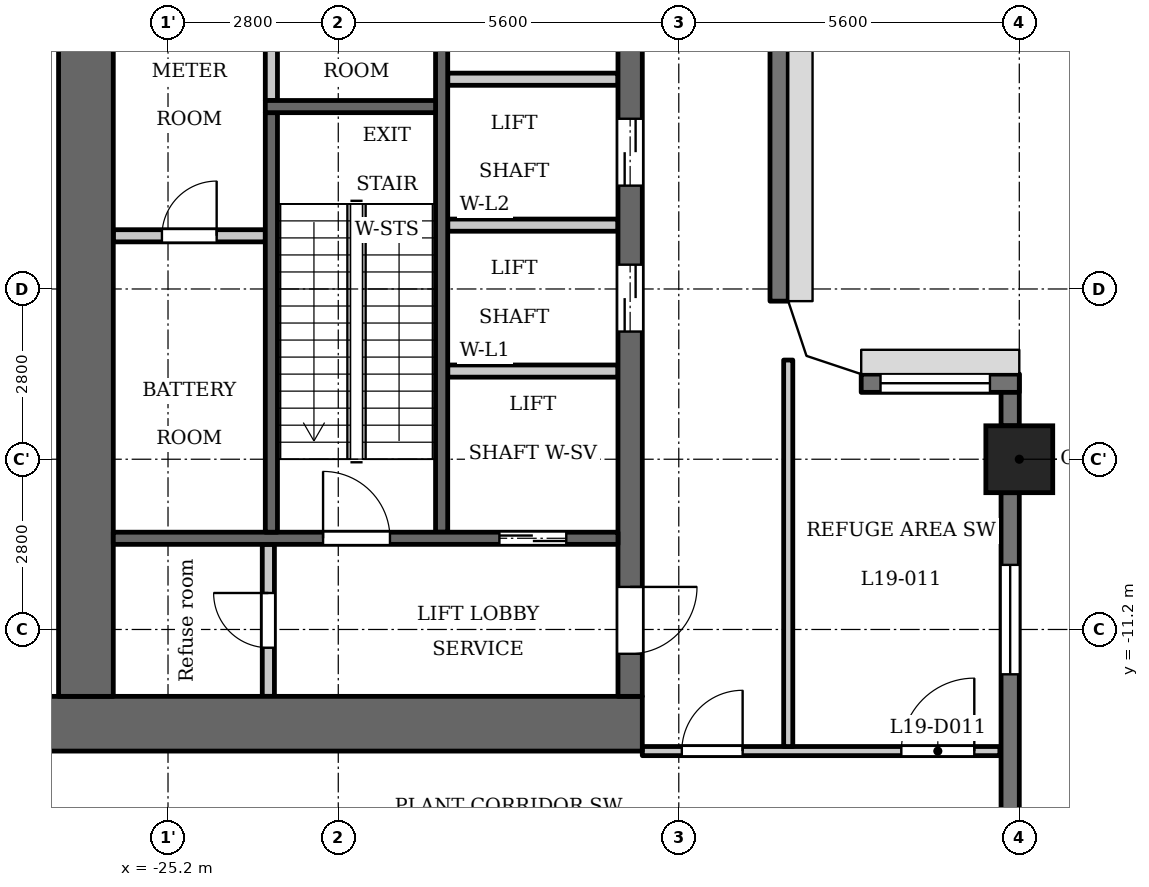
"""IFC4 building model, lengths in metres.
Left out: names, types, materials, properties, quantities, classifications, styles, units other than length and angle.
Written with IfcOpenShell. Run it as: python <this file> out.ifc"""

import sys

from ifc_helpers import new_model, si_unit, direction, frame, frame_2d, origin, origin_2d, place, context, subcontext, project, spatial, polyline, rectangle, outline, extrude, element, fill, save


model = new_model("IFC4")
c1 = context("Model", 3, precision=1e-05, world=origin(), true_north=direction((0.0, 1.0)))
c2 = subcontext(c1, "Body", "Model", "MODEL_VIEW")
j1 = project(units=[si_unit("LENGTHUNIT", "METRE"), si_unit("PLANEANGLEUNIT", "RADIAN")], contexts=[c1])
p1 = place(None, origin())
s1 = spatial("IfcSite", under=j1, at=p1, CompositionType="ELEMENT")
p2 = place(p1, origin())
s2 = spatial("IfcBuilding", under=s1, at=p2, CompositionType="ELEMENT")
p3 = place(p2, frame((0.0, 0.0, 77.9)))
s3 = spatial("IfcBuildingStorey", under=s2, at=p3, CompositionType="ELEMENT", Elevation=77.9)
p4 = place(p3, frame((-11.2, -8.4, 0.0), z_axis=(0.0, 0.0, 1.0), x_axis=(1.0, 0.0, 0.0)))
e1 = element("IfcColumn", 1, at=p4, inside=s3, PredefinedType="COLUMN", context=c2, shape_type="SweptSolid", body=[
    extrude(rectangle(XDim=1.1, YDim=1.1, at=origin_2d()), origin(), (0.0, 0.0, 1.0), 5.4),
])
p5 = place(p3, frame((-11.35, -14.925, 0.0), z_axis=(0.0, 0.0, 1.0), x_axis=(0.0, 1.0, 0.0)))
e2 = element("IfcWall", 2, at=p5, inside=s3, PredefinedType="SOLIDWALL", context=c2, shape_type="SweptSolid", body=[
    extrude(rectangle(XDim=5.975, YDim=0.3, at=frame_2d((2.988, 0.0))), origin(), (0.0, 0.0, 1.0), 5.1),
])
p6 = place(p5, frame((2.988, 0.0, 0.9)))
e3 = element("IfcOpeningElement", 3, at=p6, cuts=e2, PredefinedType="OPENING", context=c2, shape_type="SweptSolid", body=[
    extrude(rectangle(XDim=1.8, YDim=1.5, at=frame_2d((0.9, 0.75))), frame((0.0, 0.16, 0.0), z_axis=(0.0, -1.0, 0.0), x_axis=(1.0, 0.0, 0.0)), (0.0, 0.0, 1.0), 0.32),
])
p7 = place(p3, frame((-11.35, -7.85, 0.0), z_axis=(0.0, 0.0, 1.0), x_axis=(0.0, 1.0, 0.0)))
e4 = element("IfcWall", 4, at=p7, inside=s3, PredefinedType="SOLIDWALL", context=c2, shape_type="SweptSolid", body=[
    extrude(rectangle(XDim=0.85, YDim=0.3, at=frame_2d((0.425, 0.0))), origin(), (0.0, 0.0, 1.0), 5.1),
])
p8 = place(p3, frame((-11.2, -7.15, 0.0), z_axis=(0.0, 0.0, 1.0), x_axis=(-1.0, 0.0, 0.0)))
e5 = element("IfcWall", 5, at=p8, inside=s3, PredefinedType="SOLIDWALL", context=c2, shape_type="SweptSolid", body=[
    extrude(rectangle(XDim=2.6, YDim=0.3, at=frame_2d((1.3, 0.0))), origin(), (0.0, 0.0, 1.0), 5.1),
])
p9 = place(p8, frame((0.482, 0.0, 0.9)))
e6 = element("IfcOpeningElement", 6, at=p9, cuts=e5, PredefinedType="OPENING", context=c2, shape_type="SweptSolid", body=[
    extrude(rectangle(XDim=1.8, YDim=1.5, at=frame_2d((0.9, 0.75))), frame((0.0, 0.16, 0.0), z_axis=(0.0, -1.0, 0.0), x_axis=(1.0, 0.0, 0.0)), (0.0, 0.0, 1.0), 0.32),
])
p10 = place(p3, frame((-15.15, -5.8, 0.0), z_axis=(0.0, 0.0, 1.0), x_axis=(0.0, 1.0, 0.0)))
e7 = element("IfcWall", 7, at=p10, inside=s3, PredefinedType="SOLIDWALL", context=c2, shape_type="SweptSolid", body=[
    extrude(rectangle(XDim=11.6, YDim=0.3, at=frame_2d((5.8, 0.0))), origin(), (0.0, 0.0, 1.0), 5.1),
])
p11 = place(p3, frame((-23.5, -2.5, 0.0), z_axis=(0.0, 0.0, 1.0), x_axis=(0.0, 1.0, 0.0)))
e8 = element("IfcWall", 8, at=p11, inside=s3, PredefinedType="PARTITIONING", context=c2, shape_type="SweptSolid", body=[
    extrude(rectangle(XDim=2.65, YDim=0.2, at=frame_2d((1.325, 0.0))), origin(), (0.0, 0.0, 1.0), 5.1),
])
p12 = place(p3, frame((-20.7, -9.6, 0.0), z_axis=(0.0, 0.0, 1.0), x_axis=(0.0, 1.0, 0.0)))
e9 = element("IfcWall", 9, at=p12, inside=s3, PredefinedType="SHEAR", context=c2, shape_type="SweptSolid", body=[
    extrude(rectangle(XDim=9.75, YDim=0.2, at=frame_2d((4.875, 0.0))), origin(), (0.0, 0.0, 1.0), 5.1),
])
p13 = place(p3, frame((-17.4, -12.75, 0.0), z_axis=(0.0, 0.0, 1.0), x_axis=(-1.0, 0.0, 0.0)))
e10 = element("IfcWall", 10, at=p13, inside=s3, PredefinedType="SHEAR", context=c2, shape_type="SweptSolid", body=[
    extrude(rectangle(XDim=10.4, YDim=0.9, at=frame_2d((5.2, 0.0))), origin(), (0.0, 0.0, 1.0), 5.1),
])
p14 = place(p3, frame((-17.6, -12.3, 0.0), z_axis=(0.0, 0.0, 1.0), x_axis=(0.0, 1.0, 0.0)))
e11 = element("IfcWall", 11, at=p14, inside=s3, PredefinedType="SHEAR", context=c2, shape_type="SweptSolid", body=[
    extrude(rectangle(XDim=24.6, YDim=0.4, at=frame_2d((12.3, 0.0))), origin(), (0.0, 0.0, 1.0), 5.1),
])
p15 = place(p14, frame((6.0, 0.0, 0.0)))
e12 = element("IfcOpeningElement", 12, at=p15, cuts=e11, PredefinedType="OPENING", context=c2, shape_type="SweptSolid", body=[
    extrude(rectangle(XDim=1.1, YDim=2.1, at=frame_2d((0.55, 1.05))), frame((0.0, 0.21, 0.0), z_axis=(0.0, -1.0, 0.0), x_axis=(1.0, 0.0, 0.0)), (0.0, 0.0, 1.0), 0.42),
])
p16 = place(p14, frame((8.4, 0.0, 0.0)))
e13 = element("IfcOpeningElement", 13, at=p16, cuts=e11, PredefinedType="OPENING", context=c2, shape_type="SweptSolid", body=[
    extrude(rectangle(XDim=1.1, YDim=2.1, at=frame_2d((0.55, 1.05))), frame((0.0, 0.21, 0.0), z_axis=(0.0, -1.0, 0.0), x_axis=(1.0, 0.0, 0.0)), (0.0, 0.0, 1.0), 0.42),
])
p17 = place(p14, frame((10.8, 0.0, 0.0)))
e14 = element("IfcOpeningElement", 14, at=p17, cuts=e11, PredefinedType="OPENING", context=c2, shape_type="SweptSolid", body=[
    extrude(rectangle(XDim=1.1, YDim=2.1, at=frame_2d((0.55, 1.05))), frame((0.0, 0.21, 0.0), z_axis=(0.0, -1.0, 0.0), x_axis=(1.0, 0.0, 0.0)), (0.0, 0.0, 1.0), 0.42),
])
p18 = place(p14, frame((16.75, 0.0, 0.0)))
e15 = element("IfcOpeningElement", 15, at=p18, cuts=e11, PredefinedType="OPENING", context=c2, shape_type="SweptSolid", body=[
    extrude(rectangle(XDim=0.9, YDim=2.1, at=frame_2d((0.45, 1.05))), frame((0.0, 0.21, 0.0), z_axis=(0.0, -1.0, 0.0), x_axis=(1.0, 0.0, 0.0)), (0.0, 0.0, 1.0), 0.42),
])
p19 = place(p14, frame((22.8, 0.0, 0.0)))
e16 = element("IfcOpeningElement", 16, at=p19, cuts=e11, PredefinedType="OPENING", context=c2, shape_type="SweptSolid", body=[
    extrude(rectangle(XDim=1.1, YDim=2.1, at=frame_2d((0.55, 1.05))), frame((0.0, 0.21, 0.0), z_axis=(0.0, -1.0, 0.0), x_axis=(1.0, 0.0, 0.0)), (0.0, 0.0, 1.0), 0.42),
])
p20 = place(p14, frame((0.7, 0.0, 0.0)))
e17 = element("IfcOpeningElement", 17, at=p20, cuts=e11, PredefinedType="OPENING", context=c2, shape_type="SweptSolid", body=[
    extrude(rectangle(XDim=1.1, YDim=2.1, at=frame_2d((0.55, 1.05))), frame((0.0, 0.21, 0.0), z_axis=(0.0, -1.0, 0.0), x_axis=(1.0, 0.0, 0.0)), (0.0, 0.0, 1.0), 0.42),
])
p21 = place(p14, frame((12.775, 0.0, 0.0)))
e18 = element("IfcOpeningElement", 18, at=p21, cuts=e11, PredefinedType="OPENING", context=c2, shape_type="SweptSolid", body=[
    extrude(rectangle(XDim=1.8, YDim=2.1, at=frame_2d((0.9, 1.05))), frame((0.0, 0.21, 0.0), z_axis=(0.0, -1.0, 0.0), x_axis=(1.0, 0.0, 0.0)), (0.0, 0.0, 1.0), 0.42),
])
p22 = place(p3, frame((-26.55, -12.3, 0.0), z_axis=(0.0, 0.0, 1.0), x_axis=(0.0, 1.0, 0.0)))
e19 = element("IfcWall", 19, at=p22, inside=s3, PredefinedType="SHEAR", context=c2, shape_type="SweptSolid", body=[
    extrude(rectangle(XDim=24.6, YDim=0.9, at=frame_2d((12.3, 0.0))), origin(), (0.0, 0.0, 1.0), 5.1),
])
p23 = place(p3, frame((-23.55, -12.3, 0.0), z_axis=(0.0, 0.0, 1.0), x_axis=(0.0, 1.0, 0.0)))
e20 = element("IfcWall", 20, at=p23, inside=s3, PredefinedType="PARTITIONING", context=c2, shape_type="SweptSolid", body=[
    extrude(rectangle(XDim=2.5, YDim=0.2, at=frame_2d((1.25, 0.0))), origin(), (0.0, 0.0, 1.0), 5.1),
])
p24 = place(p23, frame((0.8, 0.0, 0.0)))
e21 = element("IfcOpeningElement", 21, at=p24, cuts=e20, PredefinedType="OPENING", context=c2, shape_type="SweptSolid", body=[
    extrude(rectangle(XDim=0.9, YDim=2.1, at=frame_2d((0.45, 1.05))), frame((0.0, 0.11, 0.0), z_axis=(0.0, -1.0, 0.0), x_axis=(1.0, 0.0, 0.0)), (0.0, 0.0, 1.0), 0.22),
])
p25 = place(p3, frame((-23.6, -4.725, 0.0), z_axis=(0.0, 0.0, 1.0), x_axis=(-1.0, 0.0, 0.0)))
e22 = element("IfcWall", 22, at=p25, inside=s3, PredefinedType="PARTITIONING", context=c2, shape_type="SweptSolid", body=[
    extrude(rectangle(XDim=2.5, YDim=0.2, at=frame_2d((1.25, 0.0))), origin(), (0.0, 0.0, 1.0), 5.1),
])
p26 = place(p25, frame((0.8, 0.0, 0.0)))
e23 = element("IfcOpeningElement", 23, at=p26, cuts=e22, PredefinedType="OPENING", context=c2, shape_type="SweptSolid", body=[
    extrude(rectangle(XDim=0.9, YDim=2.1, at=frame_2d((0.45, 1.05))), frame((0.0, 0.11, 0.0), z_axis=(0.0, -1.0, 0.0), x_axis=(1.0, 0.0, 0.0)), (0.0, 0.0, 1.0), 0.22),
])
p27 = place(p3, frame((-17.8, -9.7, 0.0), z_axis=(0.0, 0.0, 1.0), x_axis=(-1.0, 0.0, 0.0)))
e24 = element("IfcWall", 24, at=p27, inside=s3, PredefinedType="SHEAR", context=c2, shape_type="SweptSolid", body=[
    extrude(rectangle(XDim=8.3, YDim=0.2, at=frame_2d((4.15, 0.0))), origin(), (0.0, 0.0, 1.0), 5.1),
])
p28 = place(p27, frame((0.85, 0.0, 0.0)))
e25 = element("IfcOpeningElement", 25, at=p28, cuts=e24, PredefinedType="OPENING", context=c2, shape_type="SweptSolid", body=[
    extrude(rectangle(XDim=1.1, YDim=2.1, at=frame_2d((0.55, 1.05))), frame((0.0, 0.11, 0.0), z_axis=(0.0, -1.0, 0.0), x_axis=(1.0, 0.0, 0.0)), (0.0, 0.0, 1.0), 0.22),
])
p29 = place(p27, frame((3.75, 0.0, 0.0)))
e26 = element("IfcOpeningElement", 26, at=p29, cuts=e24, PredefinedType="OPENING", context=c2, shape_type="SweptSolid", body=[
    extrude(rectangle(XDim=1.1, YDim=2.1, at=frame_2d((0.55, 1.05))), frame((0.0, 0.11, 0.0), z_axis=(0.0, -1.0, 0.0), x_axis=(1.0, 0.0, 0.0)), (0.0, 0.0, 1.0), 0.22),
])
for number, where, z_axis, x_axis in (
    (27, (-17.8, -6.95, 0.0), (0.0, 0.0, 1.0), (-1.0, 0.0, 0.0)),
    (28, (-17.8, -4.55, 0.0), (0.0, 0.0, 1.0), (-1.0, 0.0, 0.0)),
    (29, (-17.8, -2.15, 0.0), (0.0, 0.0, 1.0), (-1.0, 0.0, 0.0)),
):
    element("IfcWall", number, at=place(p3, frame(where, z_axis=z_axis, x_axis=x_axis)), inside=s3, PredefinedType="PARTITIONING", context=c2, shape_type="SweptSolid", body=[
        extrude(rectangle(XDim=2.8, YDim=0.2, at=frame_2d((1.4, 0.0))), origin(), (0.0, 0.0, 1.0), 5.1),
    ])
p30 = place(p3, frame((-23.5, -9.6, 0.0), z_axis=(0.0, 0.0, 1.0), x_axis=(0.0, 1.0, 0.0)))
e30 = element("IfcWall", 30, at=p30, inside=s3, PredefinedType="SHEAR", context=c2, shape_type="SweptSolid", body=[
    extrude(rectangle(XDim=6.9, YDim=0.2, at=frame_2d((3.45, 0.0))), origin(), (0.0, 0.0, 1.0), 5.1),
])
p31 = place(p3, frame((-20.8, -2.6, 0.0), z_axis=(0.0, 0.0, 1.0), x_axis=(-1.0, 0.0, 0.0)))
e31 = element("IfcWall", 31, at=p31, inside=s3, PredefinedType="SHEAR", context=c2, shape_type="SweptSolid", body=[
    extrude(rectangle(XDim=2.8, YDim=0.2, at=frame_2d((1.4, 0.0))), origin(), (0.0, 0.0, 1.0), 5.1),
])
p32 = place(p3, frame((-17.4, -13.2, 0.0), z_axis=(0.0, 0.0, 1.0), x_axis=(1.0, 0.0, 0.0)))
e32 = element("IfcWall", 32, at=p32, inside=s3, PredefinedType="PARTITIONING", context=c2, shape_type="SweptSolid", body=[
    extrude(rectangle(XDim=5.88, YDim=0.15, at=frame_2d((2.94, 0.0))), origin(), (0.0, 0.0, 1.0), 5.1),
])
p33 = place(p32, frame((0.65, 0.0, 0.0)))
e33 = element("IfcOpeningElement", 33, at=p33, cuts=e32, PredefinedType="OPENING", context=c2, shape_type="SweptSolid", body=[
    extrude(rectangle(XDim=1.0, YDim=2.1, at=frame_2d((0.5, 1.05))), frame((0.0, 0.085, 0.0), z_axis=(0.0, -1.0, 0.0), x_axis=(1.0, 0.0, 0.0)), (0.0, 0.0, 1.0), 0.17),
])
p34 = place(p32, frame((4.26, 0.0, 0.0)))
e34 = element("IfcOpeningElement", 34, at=p34, cuts=e32, PredefinedType="OPENING", context=c2, shape_type="SweptSolid", body=[
    extrude(rectangle(XDim=1.2, YDim=2.1, at=frame_2d((0.6, 1.05))), frame((0.0, 0.085, 0.0), z_axis=(0.0, -1.0, 0.0), x_axis=(1.0, 0.0, 0.0)), (0.0, 0.0, 1.0), 0.17),
])
p35 = place(p3, frame((-15.0, -13.125, 0.0), z_axis=(0.0, 0.0, 1.0), x_axis=(0.0, 1.0, 0.0)))
e35 = element("IfcWall", 35, at=p35, inside=s3, PredefinedType="PARTITIONING", context=c2, shape_type="SweptSolid", body=[
    extrude(rectangle(XDim=6.356, YDim=0.15, at=frame_2d((3.178, 0.0))), origin(), (0.0, 0.0, 1.0), 5.1),
])
p36 = place(p3, origin())
e36 = element("IfcWall", 36, at=p36, inside=s3, PredefinedType="SOLIDWALL", context=c2, shape_type="SweptSolid", body=[
    extrude(outline(polyline([(-13.8, -7.0), (-14.7, -6.7), (-15.0, -5.8), (-15.3, -5.8), (-15.3, -5.849), (-14.937, -6.937), (-13.849, -7.3), (-13.8, -7.3), (-13.8, -7.0)])), origin(), (0.0, 0.0, 1.0), 5.1),
])
p37 = place(p28, origin())
e37 = element("IfcDoor", 37, at=p37, inside=s3, OperationType="DOUBLE_DOOR_SLIDING", PredefinedType="DOOR", context=c2, shape_type="SweptSolid", body=[
    extrude(rectangle(XDim=1.1, YDim=2.1, at=frame_2d((0.55, 1.05))), frame((0.0, 0.025, 0.0), z_axis=(0.0, -1.0, 0.0), x_axis=(1.0, 0.0, 0.0)), (0.0, 0.0, 1.0), 0.05),
])
fill(e25, e37)
p38 = place(p15, origin())
e38 = element("IfcDoor", 38, at=p38, inside=s3, OperationType="DOUBLE_DOOR_SLIDING", PredefinedType="DOOR", context=c2, shape_type="SweptSolid", body=[
    extrude(rectangle(XDim=1.1, YDim=2.1, at=frame_2d((0.55, 1.05))), frame((0.0, 0.025, 0.0), z_axis=(0.0, -1.0, 0.0), x_axis=(1.0, 0.0, 0.0)), (0.0, 0.0, 1.0), 0.05),
])
fill(e12, e38)
p39 = place(p16, origin())
e39 = element("IfcDoor", 39, at=p39, inside=s3, OperationType="DOUBLE_DOOR_SLIDING", PredefinedType="DOOR", context=c2, shape_type="SweptSolid", body=[
    extrude(rectangle(XDim=1.1, YDim=2.1, at=frame_2d((0.55, 1.05))), frame((0.0, 0.025, 0.0), z_axis=(0.0, -1.0, 0.0), x_axis=(1.0, 0.0, 0.0)), (0.0, 0.0, 1.0), 0.05),
])
fill(e13, e39)
p40 = place(p20, origin())
e40 = element("IfcDoor", 40, at=p40, inside=s3, OperationType="SINGLE_SWING_RIGHT", PredefinedType="DOOR", context=c2, shape_type="SweptSolid", body=[
    extrude(rectangle(XDim=1.1, YDim=2.1, at=frame_2d((0.55, 1.05))), frame((0.0, 0.025, 0.0), z_axis=(0.0, -1.0, 0.0), x_axis=(1.0, 0.0, 0.0)), (0.0, 0.0, 1.0), 0.05),
])
fill(e17, e40)
p41 = place(p24, origin())
e41 = element("IfcDoor", 41, at=p41, inside=s3, OperationType="SINGLE_SWING_LEFT", PredefinedType="DOOR", context=c2, shape_type="SweptSolid", body=[
    extrude(rectangle(XDim=0.9, YDim=2.1, at=frame_2d((0.45, 1.05))), frame((0.0, 0.025, 0.0), z_axis=(0.0, -1.0, 0.0), x_axis=(1.0, 0.0, 0.0)), (0.0, 0.0, 1.0), 0.05),
])
fill(e21, e41)
p42 = place(p29, origin())
e42 = element("IfcDoor", 42, at=p42, inside=s3, OperationType="SINGLE_SWING_RIGHT", PredefinedType="DOOR", context=c2, shape_type="SweptSolid", body=[
    extrude(rectangle(XDim=1.1, YDim=2.1, at=frame_2d((0.55, 1.05))), frame((0.0, 0.025, 0.0), z_axis=(0.0, -1.0, 0.0), x_axis=(1.0, 0.0, 0.0)), (0.0, 0.0, 1.0), 0.05),
])
fill(e26, e42)
p43 = place(p26, origin())
e43 = element("IfcDoor", 43, at=p43, inside=s3, OperationType="SINGLE_SWING_LEFT", PredefinedType="DOOR", context=c2, shape_type="SweptSolid", body=[
    extrude(rectangle(XDim=0.9, YDim=2.1, at=frame_2d((0.45, 1.05))), frame((0.0, 0.025, 0.0), z_axis=(0.0, -1.0, 0.0), x_axis=(1.0, 0.0, 0.0)), (0.0, 0.0, 1.0), 0.05),
])
fill(e23, e43)
p44 = place(p33, origin())
e44 = element("IfcDoor", 44, at=p44, inside=s3, OperationType="SINGLE_SWING_LEFT", PredefinedType="DOOR", context=c2, shape_type="SweptSolid", body=[
    extrude(rectangle(XDim=1.0, YDim=2.1, at=frame_2d((0.5, 1.05))), frame((0.0, 0.025, 0.0), z_axis=(0.0, -1.0, 0.0), x_axis=(1.0, 0.0, 0.0)), (0.0, 0.0, 1.0), 0.05),
])
fill(e33, e44)
p45 = place(p34, origin())
e45 = element("IfcDoor", 45, at=p45, inside=s3, OperationType="SINGLE_SWING_LEFT", PredefinedType="DOOR", context=c2, shape_type="SweptSolid", body=[
    extrude(rectangle(XDim=1.2, YDim=2.1, at=frame_2d((0.6, 1.05))), frame((0.0, 0.025, 0.0), z_axis=(0.0, -1.0, 0.0), x_axis=(1.0, 0.0, 0.0)), (0.0, 0.0, 1.0), 0.05),
])
fill(e34, e45)
p46 = place(p6, origin())
e46 = element("IfcWindow", 46, at=p46, inside=s3, PartitioningType="SINGLE_PANEL", PredefinedType="WINDOW", context=c2, shape_type="SweptSolid", body=[
    extrude(rectangle(XDim=1.8, YDim=1.5, at=frame_2d((0.9, 0.75))), frame((0.0, 0.03, 0.0), z_axis=(0.0, -1.0, 0.0), x_axis=(1.0, 0.0, 0.0)), (0.0, 0.0, 1.0), 0.06),
])
fill(e3, e46)
p47 = place(p9, origin())
e47 = element("IfcWindow", 47, at=p47, inside=s3, PartitioningType="SINGLE_PANEL", PredefinedType="WINDOW", context=c2, shape_type="SweptSolid", body=[
    extrude(rectangle(XDim=1.8, YDim=1.5, at=frame_2d((0.9, 0.75))), frame((0.0, 0.03, 0.0), z_axis=(0.0, -1.0, 0.0), x_axis=(1.0, 0.0, 0.0)), (0.0, 0.0, 1.0), 0.06),
])
fill(e6, e47)
save(model, sys.argv[1])
